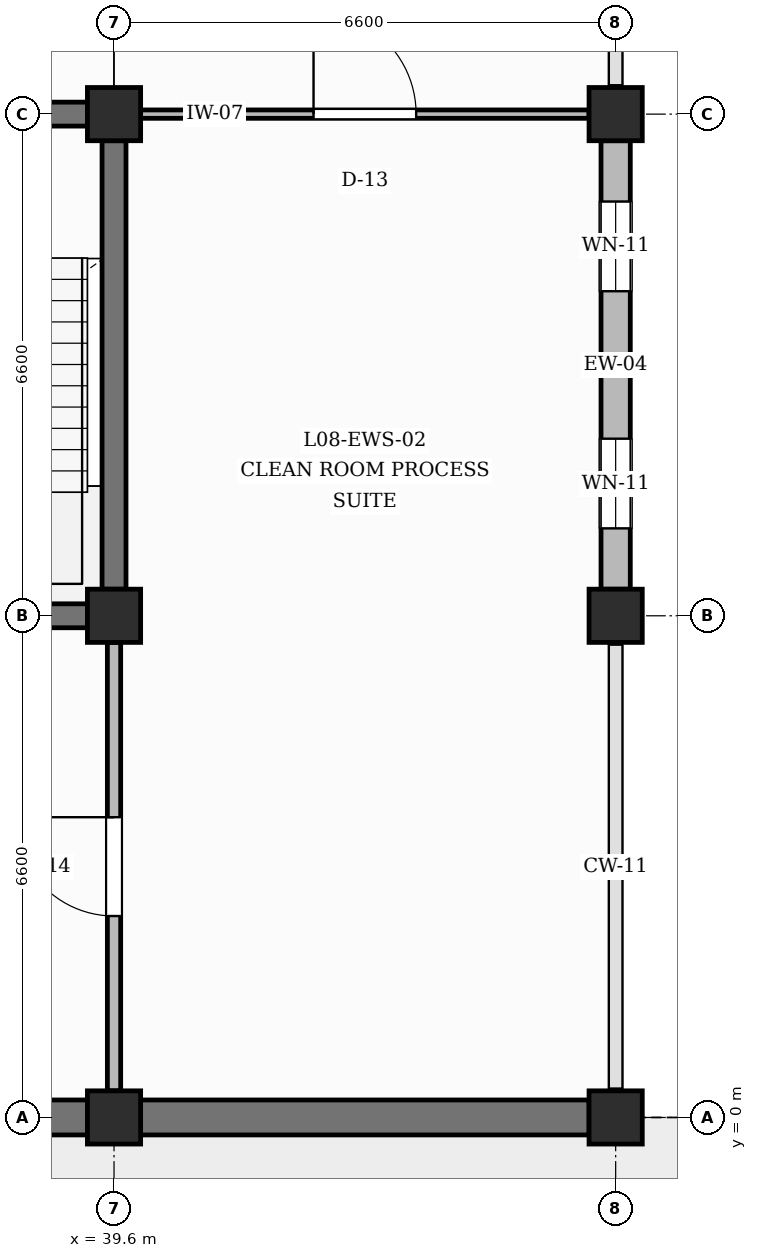
"""IFC4 building model, lengths in metres.
Left out: names, types, materials, properties, quantities, classifications, styles, units other than length and angle.
Written with IfcOpenShell. Run it as: python <this file> out.ifc"""

import sys

from ifc_helpers import new_model, si_unit, direction, frame, frame_2d, origin, origin_2d, place, context, subcontext, project, spatial, rectangle, extrude, element, fill, save


model = new_model("IFC4")
c1 = context("Model", 3, precision=1e-05, world=origin(), true_north=direction((0.0, 1.0)))
c2 = subcontext(c1, "Body", "Model", "MODEL_VIEW")
j1 = project(units=[si_unit("LENGTHUNIT", "METRE"), si_unit("PLANEANGLEUNIT", "RADIAN")], contexts=[c1])
p1 = place(None, origin())
s1 = spatial("IfcSite", under=j1, at=p1, CompositionType="ELEMENT")
p2 = place(p1, origin())
s2 = spatial("IfcBuilding", under=s1, at=p2, CompositionType="ELEMENT")
p3 = place(p2, frame((0.0, 0.0, 35.4)))
s3 = spatial("IfcBuildingStorey", under=s2, at=p3, CompositionType="ELEMENT", Elevation=35.4)
for number, where, z_axis, x_axis in (
    (1, (39.6, 0.0, 0.0), (0.0, 0.0, 1.0), (1.0, 0.0, 0.0)),
    (2, (39.6, 6.6, 0.0), (0.0, 0.0, 1.0), (1.0, 0.0, 0.0)),
    (3, (39.6, 13.2, 0.0), (0.0, 0.0, 1.0), (1.0, 0.0, 0.0)),
    (4, (46.2, 0.0, 0.0), (0.0, 0.0, 1.0), (1.0, 0.0, 0.0)),
    (5, (46.2, 6.6, 0.0), (0.0, 0.0, 1.0), (1.0, 0.0, 0.0)),
    (6, (46.2, 13.2, 0.0), (0.0, 0.0, 1.0), (1.0, 0.0, 0.0)),
):
    element("IfcColumn", number, at=place(p3, frame(where, z_axis=z_axis, x_axis=x_axis)), inside=s3, PredefinedType="COLUMN", context=c2, shape_type="SweptSolid", body=[
        extrude(rectangle(XDim=0.7, YDim=0.7, at=origin_2d()), origin(), (0.0, 0.0, 1.0), 4.2),
    ])
p4 = place(p3, frame((33.35, 0.0, 0.0), z_axis=(0.0, 0.0, 1.0), x_axis=(1.0, 0.0, 0.0)))
e7 = element("IfcWall", 7, at=p4, inside=s3, PredefinedType="SOLIDWALL", context=c2, shape_type="SweptSolid", body=[
    extrude(rectangle(XDim=5.9, YDim=0.46, at=frame_2d((2.95, 0.0))), origin(), (0.0, 0.0, 1.0), 3.28),
])
p5 = place(p3, frame((39.95, 0.0, 0.0), z_axis=(0.0, 0.0, 1.0), x_axis=(1.0, 0.0, 0.0)))
e8 = element("IfcWall", 8, at=p5, inside=s3, PredefinedType="SOLIDWALL", context=c2, shape_type="SweptSolid", body=[
    extrude(rectangle(XDim=5.9, YDim=0.46, at=frame_2d((2.95, 0.0))), origin(), (0.0, 0.0, 1.0), 3.28),
])
p6 = place(p3, frame((46.2, 6.95, 0.0), z_axis=(0.0, 0.0, 1.0), x_axis=(0.0, 1.0, 0.0)))
e9 = element("IfcWall", 9, at=p6, inside=s3, PredefinedType="SOLIDWALL", context=c2, shape_type="SweptSolid", body=[
    extrude(rectangle(XDim=5.9, YDim=0.385, at=frame_2d((2.95, 0.0))), origin(), (0.0, 0.0, 1.0), 3.28),
])
p7 = place(p6, frame((0.8, 0.0, 0.95)))
e10 = element("IfcOpeningElement", 10, at=p7, cuts=e9, PredefinedType="OPENING", context=c2, shape_type="SweptSolid", body=[
    extrude(rectangle(XDim=1.18, YDim=1.74, at=frame_2d((0.59, 0.87))), frame((0.0, 0.202, 0.0), z_axis=(0.0, -1.0, 0.0), x_axis=(1.0, 0.0, 0.0)), (0.0, 0.0, 1.0), 0.405),
])
p8 = place(p6, frame((3.92, 0.0, 0.95)))
e11 = element("IfcOpeningElement", 11, at=p8, cuts=e9, PredefinedType="OPENING", context=c2, shape_type="SweptSolid", body=[
    extrude(rectangle(XDim=1.18, YDim=1.74, at=frame_2d((0.59, 0.87))), frame((0.0, 0.202, 0.0), z_axis=(0.0, -1.0, 0.0), x_axis=(1.0, 0.0, 0.0)), (0.0, 0.0, 1.0), 0.405),
])
p9 = place(p3, frame((33.35, 6.6, 0.0), z_axis=(0.0, 0.0, 1.0), x_axis=(1.0, 0.0, 0.0)))
e12 = element("IfcWall", 12, at=p9, inside=s3, PredefinedType="SHEAR", context=c2, shape_type="SweptSolid", body=[
    extrude(rectangle(XDim=5.9, YDim=0.315, at=frame_2d((2.95, 0.0))), origin(), (0.0, 0.0, 1.0), 3.18),
])
p10 = place(p3, frame((33.35, 13.2, 0.0), z_axis=(0.0, 0.0, 1.0), x_axis=(1.0, 0.0, 0.0)))
e13 = element("IfcWall", 13, at=p10, inside=s3, PredefinedType="SHEAR", context=c2, shape_type="SweptSolid", body=[
    extrude(rectangle(XDim=5.9, YDim=0.315, at=frame_2d((2.95, 0.0))), origin(), (0.0, 0.0, 1.0), 3.18),
])
p11 = place(p10, frame((2.375, 0.0, 0.0)))
e14 = element("IfcOpeningElement", 14, at=p11, cuts=e13, PredefinedType="OPENING", context=c2, shape_type="SweptSolid", body=[
    extrude(rectangle(XDim=1.15, YDim=2.2, at=frame_2d((0.575, 1.1))), frame((0.0, 0.167, 0.0), z_axis=(0.0, -1.0, 0.0), x_axis=(1.0, 0.0, 0.0)), (0.0, 0.0, 1.0), 0.335),
])
p12 = place(p3, frame((39.6, 6.95, 0.0), z_axis=(0.0, 0.0, 1.0), x_axis=(0.0, 1.0, 0.0)))
e15 = element("IfcWall", 15, at=p12, inside=s3, PredefinedType="SHEAR", context=c2, shape_type="SweptSolid", body=[
    extrude(rectangle(XDim=5.9, YDim=0.315, at=frame_2d((2.95, 0.0))), origin(), (0.0, 0.0, 1.0), 3.18),
])
p13 = place(p3, frame((39.6, 0.35, 0.0), z_axis=(0.0, 0.0, 1.0), x_axis=(0.0, 1.0, 0.0)))
e16 = element("IfcWall", 16, at=p13, inside=s3, PredefinedType="PARTITIONING", context=c2, shape_type="SweptSolid", body=[
    extrude(rectangle(XDim=5.9, YDim=0.175, at=frame_2d((2.95, 0.0))), origin(), (0.0, 0.0, 1.0), 3.18),
])
p14 = place(p13, frame((2.3, 0.0, 0.0)))
e17 = element("IfcOpeningElement", 17, at=p14, cuts=e16, PredefinedType="OPENING", context=c2, shape_type="SweptSolid", body=[
    extrude(rectangle(XDim=1.3, YDim=2.3, at=frame_2d((0.65, 1.15))), frame((0.0, 0.097, 0.0), z_axis=(0.0, -1.0, 0.0), x_axis=(1.0, 0.0, 0.0)), (0.0, 0.0, 1.0), 0.195),
])
p15 = place(p3, frame((39.95, 13.2, 0.0), z_axis=(0.0, 0.0, 1.0), x_axis=(1.0, 0.0, 0.0)))
e18 = element("IfcWall", 18, at=p15, inside=s3, PredefinedType="PARTITIONING", context=c2, shape_type="SweptSolid", body=[
    extrude(rectangle(XDim=5.9, YDim=0.11, at=frame_2d((2.95, 0.0))), origin(), (0.0, 0.0, 1.0), 3.18),
])
p16 = place(p15, frame((2.275, 0.0, 0.0)))
e19 = element("IfcOpeningElement", 19, at=p16, cuts=e18, PredefinedType="OPENING", context=c2, shape_type="SweptSolid", body=[
    extrude(rectangle(XDim=1.35, YDim=2.3, at=frame_2d((0.675, 1.15))), frame((0.0, 0.065, 0.0), z_axis=(0.0, -1.0, 0.0), x_axis=(1.0, 0.0, 0.0)), (0.0, 0.0, 1.0), 0.13),
])
p17 = place(p7, origin())
e20 = element("IfcWindow", 20, at=p17, inside=s3, PartitioningType="SINGLE_PANEL", PredefinedType="WINDOW", context=c2, shape_type="SweptSolid", body=[
    extrude(rectangle(XDim=1.18, YDim=1.74, at=frame_2d((0.59, 0.87))), frame((0.0, 0.03, 0.0), z_axis=(0.0, -1.0, 0.0), x_axis=(1.0, 0.0, 0.0)), (0.0, 0.0, 1.0), 0.06),
])
fill(e10, e20)
p18 = place(p8, origin())
e21 = element("IfcWindow", 21, at=p18, inside=s3, PartitioningType="SINGLE_PANEL", PredefinedType="WINDOW", context=c2, shape_type="SweptSolid", body=[
    extrude(rectangle(XDim=1.18, YDim=1.74, at=frame_2d((0.59, 0.87))), frame((0.0, 0.03, 0.0), z_axis=(0.0, -1.0, 0.0), x_axis=(1.0, 0.0, 0.0)), (0.0, 0.0, 1.0), 0.06),
])
fill(e11, e21)
p19 = place(p16, origin())
e22 = element("IfcDoor", 22, at=p19, inside=s3, OperationType="SINGLE_SWING_LEFT", PredefinedType="DOOR", context=c2, shape_type="SweptSolid", body=[
    extrude(rectangle(XDim=1.35, YDim=2.3, at=frame_2d((0.675, 1.15))), frame((0.0, 0.025, 0.0), z_axis=(0.0, -1.0, 0.0), x_axis=(1.0, 0.0, 0.0)), (0.0, 0.0, 1.0), 0.05),
])
fill(e19, e22)
p20 = place(p14, origin())
e23 = element("IfcDoor", 23, at=p20, inside=s3, OperationType="SINGLE_SWING_RIGHT", PredefinedType="DOOR", context=c2, shape_type="SweptSolid", body=[
    extrude(rectangle(XDim=1.3, YDim=2.3, at=frame_2d((0.65, 1.15))), frame((0.0, 0.025, 0.0), z_axis=(0.0, -1.0, 0.0), x_axis=(1.0, 0.0, 0.0)), (0.0, 0.0, 1.0), 0.05),
])
fill(e17, e23)
save(model, sys.argv[1])
